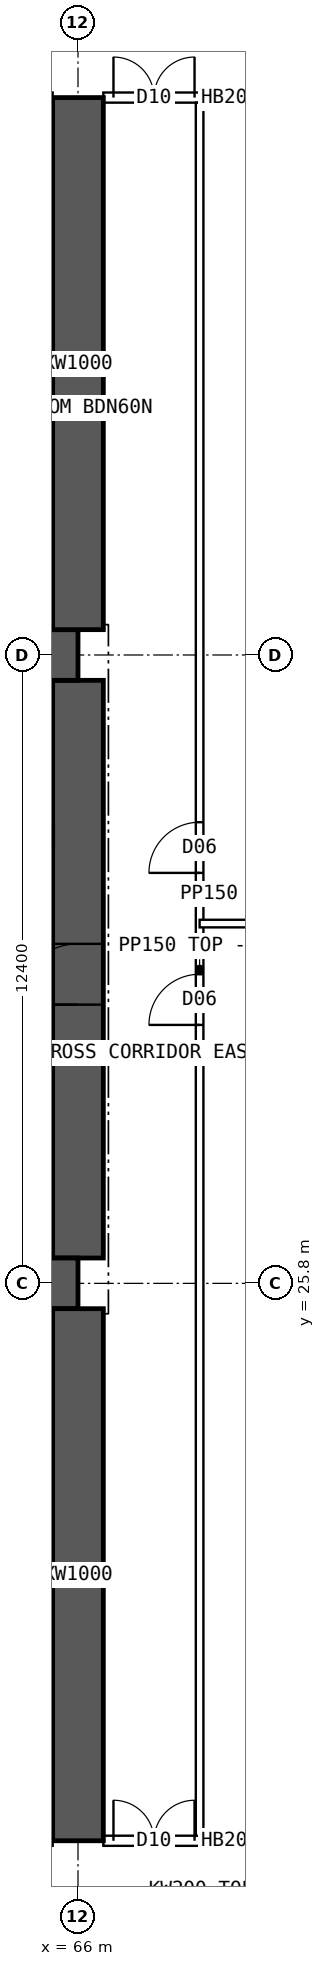
"""IFC4 building model, lengths in metres.
Left out: names, types, materials, properties, quantities, classifications, styles, units other than length and angle.
Written with IfcOpenShell. Run it as: python <this file> out.ifc"""

import sys

from ifc_helpers import new_model, si_unit, direction, frame, frame_2d, origin, place, context, subcontext, project, spatial, rectangle, extrude, element, fill, save


model = new_model("IFC4")
c1 = context("Model", 3, precision=1e-05, world=origin(), true_north=direction((0.0, 1.0)))
c2 = subcontext(c1, "Body", "Model", "MODEL_VIEW")
j1 = project(units=[si_unit("LENGTHUNIT", "METRE"), si_unit("PLANEANGLEUNIT", "RADIAN")], contexts=[c1])
p1 = place(None, origin())
s1 = spatial("IfcSite", under=j1, at=p1, CompositionType="ELEMENT")
p2 = place(p1, origin())
s2 = spatial("IfcBuilding", under=s1, at=p2, CompositionType="ELEMENT")
p3 = place(p2, frame((0.0, 0.0, 16.0)))
s3 = spatial("IfcBuildingStorey", under=s2, at=p3, CompositionType="ELEMENT", Elevation=16.0)
for number, where, z_axis, x_axis in (
    (1, (18.0, 25.8, 0.0), (0.0, 0.0, 1.0), (1.0, 0.0, 0.0)),
    (2, (18.0, 38.2, 0.0), (0.0, 0.0, 1.0), (1.0, 0.0, 0.0)),
):
    element("IfcWall", number, at=place(p3, frame(where, z_axis=z_axis, x_axis=x_axis)), inside=s3, PredefinedType="SHEAR", context=c2, shape_type="SweptSolid", body=[
        extrude(rectangle(XDim=48.0, YDim=1.0, at=frame_2d((24.0, 0.0))), origin(), (0.0, 0.0, 1.0), 4.2),
    ])
p4 = place(p3, frame((66.0, 26.3, 0.0), z_axis=(0.0, 0.0, 1.0), x_axis=(0.0, 1.0, 0.0)))
e3 = element("IfcWall", 3, at=p4, inside=s3, PredefinedType="SHEAR", context=c2, shape_type="SweptSolid", body=[
    extrude(rectangle(XDim=11.4, YDim=1.0, at=frame_2d((5.7, 0.0))), origin(), (0.0, 0.0, 1.0), 4.2),
])
p5 = place(p4, frame((5.0, 0.0, 0.0)))
e4 = element("IfcOpeningElement", 4, at=p5, cuts=e3, PredefinedType="OPENING", context=c2, shape_type="SweptSolid", body=[
    extrude(rectangle(XDim=1.2, YDim=2.1, at=frame_2d((0.6, 1.05))), frame((0.0, 0.51, 0.0), z_axis=(0.0, -1.0, 0.0), x_axis=(1.0, 0.0, 0.0)), (0.0, 0.0, 1.0), 1.02),
])
for number, where, z_axis, x_axis in (
    (5, (66.0, 14.8, 0.0), (0.0, 0.0, 1.0), (0.0, 1.0, 0.0)),
    (6, (66.0, 38.7, 0.0), (0.0, 0.0, 1.0), (0.0, 1.0, 0.0)),
):
    element("IfcWall", number, at=place(p3, frame(where, z_axis=z_axis, x_axis=x_axis)), inside=s3, PredefinedType="SHEAR", context=c2, shape_type="SweptSolid", body=[
        extrude(rectangle(XDim=10.5, YDim=1.0, at=frame_2d((5.25, 0.0))), origin(), (0.0, 0.0, 1.0), 4.2),
    ])
p6 = place(p3, frame((66.5, 14.8, 0.0), z_axis=(0.0, 0.0, 1.0), x_axis=(1.0, 0.0, 0.0)))
e7 = element("IfcWall", 7, at=p6, inside=s3, PredefinedType="SOLIDWALL", context=c2, shape_type="SweptSolid", body=[
    extrude(rectangle(XDim=5.0, YDim=0.2, at=frame_2d((2.5, 0.0))), origin(), (0.0, 0.0, 1.0), 3.95),
])
p7 = place(p6, frame((0.2, 0.0, 0.0)))
e8 = element("IfcOpeningElement", 8, at=p7, cuts=e7, PredefinedType="OPENING", context=c2, shape_type="SweptSolid", body=[
    extrude(rectangle(XDim=1.6, YDim=2.1, at=frame_2d((0.8, 1.05))), frame((0.0, 0.11, 0.0), z_axis=(0.0, -1.0, 0.0), x_axis=(1.0, 0.0, 0.0)), (0.0, 0.0, 1.0), 0.22),
])
p8 = place(p3, frame((66.5, 49.2, 0.0), z_axis=(0.0, 0.0, 1.0), x_axis=(1.0, 0.0, 0.0)))
e9 = element("IfcWall", 9, at=p8, inside=s3, PredefinedType="SOLIDWALL", context=c2, shape_type="SweptSolid", body=[
    extrude(rectangle(XDim=5.0, YDim=0.2, at=frame_2d((2.5, 0.0))), origin(), (0.0, 0.0, 1.0), 3.95),
])
p9 = place(p8, frame((0.2, 0.0, 0.0)))
e10 = element("IfcOpeningElement", 10, at=p9, cuts=e9, PredefinedType="OPENING", context=c2, shape_type="SweptSolid", body=[
    extrude(rectangle(XDim=1.6, YDim=2.1, at=frame_2d((0.8, 1.05))), frame((0.0, 0.11, 0.0), z_axis=(0.0, -1.0, 0.0), x_axis=(1.0, 0.0, 0.0)), (0.0, 0.0, 1.0), 0.22),
])
p10 = place(p3, frame((68.4, 14.9, 0.0), z_axis=(0.0, 0.0, 1.0), x_axis=(0.0, 1.0, 0.0)))
e11 = element("IfcWall", 11, at=p10, inside=s3, PredefinedType="PARTITIONING", context=c2, shape_type="SweptSolid", body=[
    extrude(rectangle(XDim=34.2, YDim=0.15, at=frame_2d((17.1, 0.0))), origin(), (0.0, 0.0, 1.0), 3.95),
])
p11 = place(p10, frame((16.0, 0.0, 0.0)))
e12 = element("IfcOpeningElement", 12, at=p11, cuts=e11, PredefinedType="OPENING", context=c2, shape_type="SweptSolid", body=[
    extrude(rectangle(XDim=1.0, YDim=2.1, at=frame_2d((0.5, 1.05))), frame((0.0, 0.085, 0.0), z_axis=(0.0, -1.0, 0.0), x_axis=(1.0, 0.0, 0.0)), (0.0, 0.0, 1.0), 0.17),
])
p12 = place(p10, frame((19.0, 0.0, 0.0)))
e13 = element("IfcOpeningElement", 13, at=p12, cuts=e11, PredefinedType="OPENING", context=c2, shape_type="SweptSolid", body=[
    extrude(rectangle(XDim=1.0, YDim=2.1, at=frame_2d((0.5, 1.05))), frame((0.0, 0.085, 0.0), z_axis=(0.0, -1.0, 0.0), x_axis=(1.0, 0.0, 0.0)), (0.0, 0.0, 1.0), 0.17),
])
p13 = place(p3, frame((68.4, 32.9, 0.0), z_axis=(0.0, 0.0, 1.0), x_axis=(1.0, 0.0, 0.0)))
e14 = element("IfcWall", 14, at=p13, inside=s3, PredefinedType="PARTITIONING", context=c2, shape_type="SweptSolid", body=[
    extrude(rectangle(XDim=3.6, YDim=0.15, at=frame_2d((1.8, 0.0))), origin(), (0.0, 0.0, 1.0), 3.95),
])
p14 = place(p5, origin())
e15 = element("IfcDoor", 15, at=p14, inside=s3, OperationType="SINGLE_SWING_LEFT", PredefinedType="DOOR", context=c2, shape_type="SweptSolid", body=[
    extrude(rectangle(XDim=1.2, YDim=2.1, at=frame_2d((0.6, 1.05))), frame((0.0, 0.025, 0.0), z_axis=(0.0, -1.0, 0.0), x_axis=(1.0, 0.0, 0.0)), (0.0, 0.0, 1.0), 0.05),
])
fill(e4, e15)
p15 = place(p7, origin())
e16 = element("IfcDoor", 16, at=p15, inside=s3, OperationType="DOUBLE_DOOR_SINGLE_SWING", PredefinedType="DOOR", context=c2, shape_type="SweptSolid", body=[
    extrude(rectangle(XDim=1.6, YDim=2.1, at=frame_2d((0.8, 1.05))), frame((0.0, 0.025, 0.0), z_axis=(0.0, -1.0, 0.0), x_axis=(1.0, 0.0, 0.0)), (0.0, 0.0, 1.0), 0.05),
])
fill(e8, e16)
p16 = place(p9, origin())
e17 = element("IfcDoor", 17, at=p16, inside=s3, OperationType="DOUBLE_DOOR_SINGLE_SWING", PredefinedType="DOOR", context=c2, shape_type="SweptSolid", body=[
    extrude(rectangle(XDim=1.6, YDim=2.1, at=frame_2d((0.8, 1.05))), frame((0.0, 0.025, 0.0), z_axis=(0.0, -1.0, 0.0), x_axis=(1.0, 0.0, 0.0)), (0.0, 0.0, 1.0), 0.05),
])
fill(e10, e17)
p17 = place(p11, origin())
e18 = element("IfcDoor", 18, at=p17, inside=s3, OperationType="SINGLE_SWING_LEFT", PredefinedType="DOOR", context=c2, shape_type="SweptSolid", body=[
    extrude(rectangle(XDim=1.0, YDim=2.1, at=frame_2d((0.5, 1.05))), frame((0.0, 0.025, 0.0), z_axis=(0.0, -1.0, 0.0), x_axis=(1.0, 0.0, 0.0)), (0.0, 0.0, 1.0), 0.05),
])
fill(e12, e18)
p18 = place(p12, origin())
e19 = element("IfcDoor", 19, at=p18, inside=s3, OperationType="SINGLE_SWING_LEFT", PredefinedType="DOOR", context=c2, shape_type="SweptSolid", body=[
    extrude(rectangle(XDim=1.0, YDim=2.1, at=frame_2d((0.5, 1.05))), frame((0.0, 0.025, 0.0), z_axis=(0.0, -1.0, 0.0), x_axis=(1.0, 0.0, 0.0)), (0.0, 0.0, 1.0), 0.05),
])
fill(e13, e19)
save(model, sys.argv[1])
